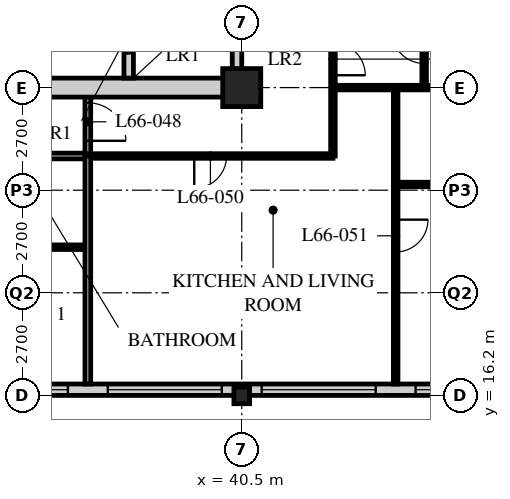
"""IFC4 building model, lengths in metres.
Left out: names, types, materials, properties, quantities, classifications, styles, units other than length and angle.
Written with IfcOpenShell. Run it as: python <this file> out.ifc"""

import sys

from ifc_helpers import new_model, si_unit, direction, frame, frame_2d, origin, origin_2d, place, context, subcontext, project, spatial, rectangle, hollow_rectangle, i_section, extrude, element, fill, save


model = new_model("IFC4")
c1 = context("Model", 3, precision=1e-05, world=origin(), true_north=direction((0.0, 1.0)))
c2 = subcontext(c1, "Body", "Model", "MODEL_VIEW")
j1 = project(units=[si_unit("LENGTHUNIT", "METRE"), si_unit("PLANEANGLEUNIT", "RADIAN")], contexts=[c1])
p1 = place(None, origin())
s1 = spatial("IfcSite", under=j1, at=p1, CompositionType="ELEMENT")
p2 = place(p1, origin())
s2 = spatial("IfcBuilding", under=s1, at=p2, CompositionType="ELEMENT")
p3 = place(p2, frame((0.0, 0.0, 258.0)))
s3 = spatial("IfcBuildingStorey", under=s2, at=p3, CompositionType="ELEMENT", Elevation=258.0)
p4 = place(p3, frame((40.5, 16.2, 0.0), z_axis=(0.0, 0.0, 1.0), x_axis=(1.0, 0.0, 0.0)))
e1 = element("IfcColumn", 1, at=p4, inside=s3, PredefinedType="COLUMN", context=c2, shape_type="SweptSolid", body=[
    extrude(i_section(OverallWidth=0.412, OverallDepth=0.437, WebThickness=0.036, FlangeThickness=0.058, FilletRadius=0.015, at=origin_2d()), origin(), (0.0, 0.0, 1.0), 3.9),
])
p5 = place(p3, frame((40.5, 24.3, 0.0), z_axis=(0.0, 0.0, 1.0), x_axis=(1.0, 0.0, 0.0)))
e2 = element("IfcColumn", 2, at=p5, inside=s3, PredefinedType="COLUMN", context=c2, shape_type="SweptSolid", body=[
    extrude(hollow_rectangle(XDim=1.0, YDim=1.0, WallThickness=0.1, at=origin_2d()), origin(), (0.0, 0.0, 1.0), 3.9),
])
p6 = place(p3, frame((8.4, 16.35, 0.0), z_axis=(0.0, 0.0, 1.0), x_axis=(1.0, 0.0, 0.0)))
e3 = element("IfcWall", 3, at=p6, inside=s3, PredefinedType="SOLIDWALL", context=c2, shape_type="SweptSolid", body=[
    extrude(rectangle(XDim=40.2, YDim=0.3, at=frame_2d((20.1, 0.0))), origin(), (0.0, 0.0, 1.0), 3.69),
])
p7 = place(p6, frame((0.225, 0.0, 0.6)))
e4 = element("IfcOpeningElement", 4, at=p7, cuts=e3, PredefinedType="OPENING", context=c2, shape_type="SweptSolid", body=[
    extrude(rectangle(XDim=3.0, YDim=2.4, at=frame_2d((1.5, 1.2))), frame((0.0, 0.16, 0.0), z_axis=(0.0, -1.0, 0.0), x_axis=(1.0, 0.0, 0.0)), (0.0, 0.0, 1.0), 0.32),
])
p8 = place(p6, frame((4.275, 0.0, 0.6)))
e5 = element("IfcOpeningElement", 5, at=p8, cuts=e3, PredefinedType="OPENING", context=c2, shape_type="SweptSolid", body=[
    extrude(rectangle(XDim=3.0, YDim=2.4, at=frame_2d((1.5, 1.2))), frame((0.0, 0.16, 0.0), z_axis=(0.0, -1.0, 0.0), x_axis=(1.0, 0.0, 0.0)), (0.0, 0.0, 1.0), 0.32),
])
p9 = place(p6, frame((8.325, 0.0, 0.6)))
e6 = element("IfcOpeningElement", 6, at=p9, cuts=e3, PredefinedType="OPENING", context=c2, shape_type="SweptSolid", body=[
    extrude(rectangle(XDim=3.0, YDim=2.4, at=frame_2d((1.5, 1.2))), frame((0.0, 0.16, 0.0), z_axis=(0.0, -1.0, 0.0), x_axis=(1.0, 0.0, 0.0)), (0.0, 0.0, 1.0), 0.32),
])
p10 = place(p6, frame((12.375, 0.0, 0.6)))
e7 = element("IfcOpeningElement", 7, at=p10, cuts=e3, PredefinedType="OPENING", context=c2, shape_type="SweptSolid", body=[
    extrude(rectangle(XDim=3.0, YDim=2.4, at=frame_2d((1.5, 1.2))), frame((0.0, 0.16, 0.0), z_axis=(0.0, -1.0, 0.0), x_axis=(1.0, 0.0, 0.0)), (0.0, 0.0, 1.0), 0.32),
])
p11 = place(p6, frame((16.425, 0.0, 0.6)))
e8 = element("IfcOpeningElement", 8, at=p11, cuts=e3, PredefinedType="OPENING", context=c2, shape_type="SweptSolid", body=[
    extrude(rectangle(XDim=3.0, YDim=2.4, at=frame_2d((1.5, 1.2))), frame((0.0, 0.16, 0.0), z_axis=(0.0, -1.0, 0.0), x_axis=(1.0, 0.0, 0.0)), (0.0, 0.0, 1.0), 0.32),
])
p12 = place(p6, frame((20.475, 0.0, 0.6)))
e9 = element("IfcOpeningElement", 9, at=p12, cuts=e3, PredefinedType="OPENING", context=c2, shape_type="SweptSolid", body=[
    extrude(rectangle(XDim=3.0, YDim=2.4, at=frame_2d((1.5, 1.2))), frame((0.0, 0.16, 0.0), z_axis=(0.0, -1.0, 0.0), x_axis=(1.0, 0.0, 0.0)), (0.0, 0.0, 1.0), 0.32),
])
p13 = place(p6, frame((24.525, 0.0, 0.6)))
e10 = element("IfcOpeningElement", 10, at=p13, cuts=e3, PredefinedType="OPENING", context=c2, shape_type="SweptSolid", body=[
    extrude(rectangle(XDim=3.0, YDim=2.4, at=frame_2d((1.5, 1.2))), frame((0.0, 0.16, 0.0), z_axis=(0.0, -1.0, 0.0), x_axis=(1.0, 0.0, 0.0)), (0.0, 0.0, 1.0), 0.32),
])
p14 = place(p6, frame((28.575, 0.0, 0.6)))
e11 = element("IfcOpeningElement", 11, at=p14, cuts=e3, PredefinedType="OPENING", context=c2, shape_type="SweptSolid", body=[
    extrude(rectangle(XDim=3.0, YDim=2.4, at=frame_2d((1.5, 1.2))), frame((0.0, 0.16, 0.0), z_axis=(0.0, -1.0, 0.0), x_axis=(1.0, 0.0, 0.0)), (0.0, 0.0, 1.0), 0.32),
])
p15 = place(p6, frame((32.625, 0.0, 0.6)))
e12 = element("IfcOpeningElement", 12, at=p15, cuts=e3, PredefinedType="OPENING", context=c2, shape_type="SweptSolid", body=[
    extrude(rectangle(XDim=3.0, YDim=2.4, at=frame_2d((1.5, 1.2))), frame((0.0, 0.16, 0.0), z_axis=(0.0, -1.0, 0.0), x_axis=(1.0, 0.0, 0.0)), (0.0, 0.0, 1.0), 0.32),
])
p16 = place(p6, frame((36.675, 0.0, 0.6)))
e13 = element("IfcOpeningElement", 13, at=p16, cuts=e3, PredefinedType="OPENING", context=c2, shape_type="SweptSolid", body=[
    extrude(rectangle(XDim=3.0, YDim=2.4, at=frame_2d((1.5, 1.2))), frame((0.0, 0.16, 0.0), z_axis=(0.0, -1.0, 0.0), x_axis=(1.0, 0.0, 0.0)), (0.0, 0.0, 1.0), 0.32),
])
p17 = place(p3, frame((8.1, 22.5, 0.0), z_axis=(0.0, 0.0, 1.0), x_axis=(1.0, 0.0, 0.0)))
e14 = element("IfcWall", 14, at=p17, inside=s3, PredefinedType="PARTITIONING", context=c2, shape_type="SweptSolid", body=[
    extrude(rectangle(XDim=28.35, YDim=0.15, at=frame_2d((14.175, 0.0))), origin(), (0.0, 0.0, 1.0), 3.69),
])
p18 = place(p17, frame((4.45, 0.0, 0.0)))
e15 = element("IfcOpeningElement", 15, at=p18, cuts=e14, PredefinedType="OPENING", context=c2, shape_type="SweptSolid", body=[
    extrude(rectangle(XDim=1.0, YDim=2.1, at=frame_2d((0.5, 1.05))), frame((0.0, 0.085, 0.0), z_axis=(0.0, -1.0, 0.0), x_axis=(1.0, 0.0, 0.0)), (0.0, 0.0, 1.0), 0.17),
])
p19 = place(p17, frame((12.55, 0.0, 0.0)))
e16 = element("IfcOpeningElement", 16, at=p19, cuts=e14, PredefinedType="OPENING", context=c2, shape_type="SweptSolid", body=[
    extrude(rectangle(XDim=1.0, YDim=2.1, at=frame_2d((0.5, 1.05))), frame((0.0, 0.085, 0.0), z_axis=(0.0, -1.0, 0.0), x_axis=(1.0, 0.0, 0.0)), (0.0, 0.0, 1.0), 0.17),
])
p20 = place(p17, frame((20.65, 0.0, 0.0)))
e17 = element("IfcOpeningElement", 17, at=p20, cuts=e14, PredefinedType="OPENING", context=c2, shape_type="SweptSolid", body=[
    extrude(rectangle(XDim=1.0, YDim=2.1, at=frame_2d((0.5, 1.05))), frame((0.0, 0.085, 0.0), z_axis=(0.0, -1.0, 0.0), x_axis=(1.0, 0.0, 0.0)), (0.0, 0.0, 1.0), 0.17),
])
p21 = place(p17, frame((2.625, 0.0, 0.0)))
e18 = element("IfcOpeningElement", 18, at=p21, cuts=e14, PredefinedType="OPENING", context=c2, shape_type="SweptSolid", body=[
    extrude(rectangle(XDim=1.0, YDim=2.1, at=frame_2d((0.5, 1.05))), frame((0.0, 0.085, 0.0), z_axis=(0.0, -1.0, 0.0), x_axis=(1.0, 0.0, 0.0)), (0.0, 0.0, 1.0), 0.17),
])
p22 = place(p3, frame((36.45, 22.5, 0.0), z_axis=(0.0, 0.0, 1.0), x_axis=(0.0, 1.0, 0.0)))
e19 = element("IfcWall", 19, at=p22, inside=s3, PredefinedType="PARTITIONING", context=c2, shape_type="SweptSolid", body=[
    extrude(rectangle(XDim=1.8, YDim=0.15, at=frame_2d((0.9, 0.0))), origin(), (0.0, 0.0, 1.0), 3.69),
])
p23 = place(p22, frame((0.4, 0.0, 0.0)))
e20 = element("IfcOpeningElement", 20, at=p23, cuts=e19, PredefinedType="OPENING", context=c2, shape_type="SweptSolid", body=[
    extrude(rectangle(XDim=1.0, YDim=2.1, at=frame_2d((0.5, 1.05))), frame((0.0, 0.085, 0.0), z_axis=(0.0, -1.0, 0.0), x_axis=(1.0, 0.0, 0.0)), (0.0, 0.0, 1.0), 0.17),
])
p24 = place(p3, frame((8.1, 20.1, 0.0), z_axis=(0.0, 0.0, 1.0), x_axis=(1.0, 0.0, 0.0)))
e21 = element("IfcWall", 21, at=p24, inside=s3, PredefinedType="PARTITIONING", context=c2, shape_type="SweptSolid", body=[
    extrude(rectangle(XDim=28.35, YDim=0.12, at=frame_2d((14.175, 0.0))), origin(), (0.0, 0.0, 1.0), 3.69),
])
p25 = place(p24, frame((5.025, 0.0, 0.0)))
e22 = element("IfcOpeningElement", 22, at=p25, cuts=e21, PredefinedType="OPENING", context=c2, shape_type="SweptSolid", body=[
    extrude(rectangle(XDim=0.85, YDim=2.1, at=frame_2d((0.425, 1.05))), frame((0.0, 0.07, 0.0), z_axis=(0.0, -1.0, 0.0), x_axis=(1.0, 0.0, 0.0)), (0.0, 0.0, 1.0), 0.14),
])
p26 = place(p24, frame((8.425, 0.0, 0.0)))
e23 = element("IfcOpeningElement", 23, at=p26, cuts=e21, PredefinedType="OPENING", context=c2, shape_type="SweptSolid", body=[
    extrude(rectangle(XDim=0.85, YDim=2.1, at=frame_2d((0.425, 1.05))), frame((0.0, 0.07, 0.0), z_axis=(0.0, -1.0, 0.0), x_axis=(1.0, 0.0, 0.0)), (0.0, 0.0, 1.0), 0.14),
])
p27 = place(p24, frame((13.125, 0.0, 0.0)))
e24 = element("IfcOpeningElement", 24, at=p27, cuts=e21, PredefinedType="OPENING", context=c2, shape_type="SweptSolid", body=[
    extrude(rectangle(XDim=0.85, YDim=2.1, at=frame_2d((0.425, 1.05))), frame((0.0, 0.07, 0.0), z_axis=(0.0, -1.0, 0.0), x_axis=(1.0, 0.0, 0.0)), (0.0, 0.0, 1.0), 0.14),
])
p28 = place(p24, frame((16.525, 0.0, 0.0)))
e25 = element("IfcOpeningElement", 25, at=p28, cuts=e21, PredefinedType="OPENING", context=c2, shape_type="SweptSolid", body=[
    extrude(rectangle(XDim=0.85, YDim=2.1, at=frame_2d((0.425, 1.05))), frame((0.0, 0.07, 0.0), z_axis=(0.0, -1.0, 0.0), x_axis=(1.0, 0.0, 0.0)), (0.0, 0.0, 1.0), 0.14),
])
p29 = place(p24, frame((21.225, 0.0, 0.0)))
e26 = element("IfcOpeningElement", 26, at=p29, cuts=e21, PredefinedType="OPENING", context=c2, shape_type="SweptSolid", body=[
    extrude(rectangle(XDim=0.85, YDim=2.1, at=frame_2d((0.425, 1.05))), frame((0.0, 0.07, 0.0), z_axis=(0.0, -1.0, 0.0), x_axis=(1.0, 0.0, 0.0)), (0.0, 0.0, 1.0), 0.14),
])
p30 = place(p24, frame((24.625, 0.0, 0.0)))
e27 = element("IfcOpeningElement", 27, at=p30, cuts=e21, PredefinedType="OPENING", context=c2, shape_type="SweptSolid", body=[
    extrude(rectangle(XDim=0.85, YDim=2.1, at=frame_2d((0.425, 1.05))), frame((0.0, 0.07, 0.0), z_axis=(0.0, -1.0, 0.0), x_axis=(1.0, 0.0, 0.0)), (0.0, 0.0, 1.0), 0.14),
])
p31 = place(p24, frame((2.725, 0.0, 0.0)))
e28 = element("IfcOpeningElement", 28, at=p31, cuts=e21, PredefinedType="OPENING", context=c2, shape_type="SweptSolid", body=[
    extrude(rectangle(XDim=0.85, YDim=2.1, at=frame_2d((0.425, 1.05))), frame((0.0, 0.07, 0.0), z_axis=(0.0, -1.0, 0.0), x_axis=(1.0, 0.0, 0.0)), (0.0, 0.0, 1.0), 0.14),
])
p32 = place(p3, frame((42.9, 22.5, 0.0), z_axis=(0.0, 0.0, 1.0), x_axis=(0.0, 1.0, 0.0)))
e29 = element("IfcWall", 29, at=p32, inside=s3, PredefinedType="PARTITIONING", context=c2, shape_type="SweptSolid", body=[
    extrude(rectangle(XDim=9.9, YDim=0.12, at=frame_2d((4.95, 0.0))), origin(), (0.0, 0.0, 1.0), 3.69),
])
p33 = place(p32, frame((2.125, 0.0, 0.0)))
e30 = element("IfcOpeningElement", 30, at=p33, cuts=e29, PredefinedType="OPENING", context=c2, shape_type="SweptSolid", body=[
    extrude(rectangle(XDim=0.85, YDim=2.1, at=frame_2d((0.425, 1.05))), frame((0.0, 0.07, 0.0), z_axis=(0.0, -1.0, 0.0), x_axis=(1.0, 0.0, 0.0)), (0.0, 0.0, 1.0), 0.14),
])
p34 = place(p32, frame((6.175, 0.0, 0.0)))
e31 = element("IfcOpeningElement", 31, at=p34, cuts=e29, PredefinedType="OPENING", context=c2, shape_type="SweptSolid", body=[
    extrude(rectangle(XDim=0.85, YDim=2.1, at=frame_2d((0.425, 1.05))), frame((0.0, 0.07, 0.0), z_axis=(0.0, -1.0, 0.0), x_axis=(1.0, 0.0, 0.0)), (0.0, 0.0, 1.0), 0.14),
])
p35 = place(p3, frame((36.45, 22.5, 0.0), z_axis=(0.0, 0.0, 1.0), x_axis=(1.0, 0.0, 0.0)))
e32 = element("IfcWall", 32, at=p35, inside=s3, PredefinedType="PARTITIONING", context=c2, shape_type="SweptSolid", body=[
    extrude(rectangle(XDim=6.45, YDim=0.12, at=frame_2d((3.225, 0.0))), origin(), (0.0, 0.0, 1.0), 3.69),
])
p36 = place(p35, frame((2.8, 0.0, 0.0)))
e33 = element("IfcOpeningElement", 33, at=p36, cuts=e32, PredefinedType="OPENING", context=c2, shape_type="SweptSolid", body=[
    extrude(rectangle(XDim=0.85, YDim=2.1, at=frame_2d((0.425, 1.05))), frame((0.0, 0.07, 0.0), z_axis=(0.0, -1.0, 0.0), x_axis=(1.0, 0.0, 0.0)), (0.0, 0.0, 1.0), 0.14),
])
p37 = place(p3, frame((42.9, 24.3, 0.0), z_axis=(0.0, 0.0, 1.0), x_axis=(1.0, 0.0, 0.0)))
e34 = element("IfcWall", 34, at=p37, inside=s3, PredefinedType="PARTITIONING", context=c2, shape_type="SweptSolid", body=[
    extrude(rectangle(XDim=9.45, YDim=0.12, at=frame_2d((4.725, 0.0))), origin(), (0.0, 0.0, 1.0), 3.078),
])
p38 = place(p3, frame((36.45, 16.5, 0.0), z_axis=(0.0, 0.0, 1.0), x_axis=(0.0, 1.0, 0.0)))
e35 = element("IfcWall", 35, at=p38, inside=s3, PredefinedType="PARTITIONING", context=c2, shape_type="SweptSolid", body=[
    extrude(rectangle(XDim=6.0, YDim=0.15, at=frame_2d((3.0, 0.0))), origin(), (0.0, 0.0, 1.0), 3.69),
])
p39 = place(p3, frame((44.55, 16.5, 0.0), z_axis=(0.0, 0.0, 1.0), x_axis=(0.0, 1.0, 0.0)))
e36 = element("IfcWall", 36, at=p39, inside=s3, PredefinedType="PARTITIONING", context=c2, shape_type="SweptSolid", body=[
    extrude(rectangle(XDim=7.8, YDim=0.12, at=frame_2d((3.9, 0.0))), origin(), (0.0, 0.0, 1.0), 3.69),
])
p40 = place(p39, frame((3.475, 0.0, 0.0)))
e37 = element("IfcOpeningElement", 37, at=p40, cuts=e36, PredefinedType="OPENING", context=c2, shape_type="SweptSolid", body=[
    extrude(rectangle(XDim=0.85, YDim=2.1, at=frame_2d((0.425, 1.05))), frame((0.0, 0.07, 0.0), z_axis=(0.0, -1.0, 0.0), x_axis=(1.0, 0.0, 0.0)), (0.0, 0.0, 1.0), 0.14),
])
p41 = place(p3, frame((45.3, 24.3, 0.0), z_axis=(0.0, 0.0, 1.0), x_axis=(0.0, 1.0, 0.0)))
e38 = element("IfcWall", 38, at=p41, inside=s3, PredefinedType="PARTITIONING", context=c2, shape_type="SweptSolid", body=[
    extrude(rectangle(XDim=1.76, YDim=0.12, at=frame_2d((0.88, 0.0))), origin(), (0.0, 0.0, 1.0), 3.69),
])
p42 = place(p41, frame((0.635, 0.0, 0.0)))
e39 = element("IfcOpeningElement", 39, at=p42, cuts=e38, PredefinedType="OPENING", context=c2, shape_type="SweptSolid", body=[
    extrude(rectangle(XDim=0.85, YDim=2.1, at=frame_2d((0.425, 1.05))), frame((0.0, 0.07, 0.0), z_axis=(0.0, -1.0, 0.0), x_axis=(1.0, 0.0, 0.0)), (0.0, 0.0, 1.0), 0.14),
])
p43 = place(p3, frame((44.55, 21.75, 0.0), z_axis=(0.0, 0.0, 1.0), x_axis=(1.0, 0.0, 0.0)))
e40 = element("IfcWall", 40, at=p43, inside=s3, PredefinedType="PARTITIONING", context=c2, shape_type="SweptSolid", body=[
    extrude(rectangle(XDim=7.8, YDim=0.12, at=frame_2d((3.9, 0.0))), origin(), (0.0, 0.0, 1.0), 3.69),
])
p44 = place(p43, frame((3.475, 0.0, 0.0)))
e41 = element("IfcOpeningElement", 41, at=p44, cuts=e40, PredefinedType="OPENING", context=c2, shape_type="SweptSolid", body=[
    extrude(rectangle(XDim=0.85, YDim=2.1, at=frame_2d((0.425, 1.05))), frame((0.0, 0.07, 0.0), z_axis=(0.0, -1.0, 0.0), x_axis=(1.0, 0.0, 0.0)), (0.0, 0.0, 1.0), 0.14),
])
p45 = place(p3, frame((15.95, 24.3, 0.0), z_axis=(0.0, 0.0, 1.0), x_axis=(1.0, 0.0, 0.0)))
e42 = element("IfcWall", 42, at=p45, inside=s3, PredefinedType="SOLIDWALL", context=c2, shape_type="SweptSolid", body=[
    extrude(rectangle(XDim=24.55, YDim=0.5, at=frame_2d((12.275, 0.0))), origin(), (0.0, 0.0, 1.0), 3.04),
])
p46 = place(p45, frame((11.5, 0.0, 0.0)))
e43 = element("IfcOpeningElement", 43, at=p46, cuts=e42, PredefinedType="OPENING", context=c2, shape_type="SweptSolid", body=[
    extrude(rectangle(XDim=1.8, YDim=2.4, at=frame_2d((0.9, 1.2))), frame((0.0, 0.26, 0.0), z_axis=(0.0, -1.0, 0.0), x_axis=(1.0, 0.0, 0.0)), (0.0, 0.0, 1.0), 0.52),
])
p47 = place(p3, frame((40.375, 24.55, 0.0), z_axis=(0.0, 0.0, 1.0), x_axis=(0.0, 1.0, 0.0)))
e44 = element("IfcWall", 44, at=p47, inside=s3, PredefinedType="SOLIDWALL", context=c2, shape_type="SweptSolid", body=[
    extrude(rectangle(XDim=15.7, YDim=0.25, at=frame_2d((7.85, 0.0))), origin(), (0.0, 0.0, 1.0), 3.078),
])
p48 = place(p3, frame((37.525, 24.55, 0.0), z_axis=(0.0, 0.0, 1.0), x_axis=(0.0, 1.0, 0.0)))
e45 = element("IfcWall", 45, at=p48, inside=s3, PredefinedType="SOLIDWALL", context=c2, shape_type="SweptSolid", body=[
    extrude(rectangle(XDim=7.75, YDim=0.25, at=frame_2d((3.875, 0.0))), origin(), (0.0, 0.0, 1.0), 3.69),
])
p49 = place(p48, frame((0.65, 0.0, 0.0)))
e46 = element("IfcOpeningElement", 46, at=p49, cuts=e45, PredefinedType="OPENING", context=c2, shape_type="SweptSolid", body=[
    extrude(rectangle(XDim=1.1, YDim=2.4, at=frame_2d((0.55, 1.2))), frame((0.0, 0.135, 0.0), z_axis=(0.0, -1.0, 0.0), x_axis=(1.0, 0.0, 0.0)), (0.0, 0.0, 1.0), 0.27),
])
p50 = place(p48, frame((3.25, 0.0, 0.0)))
e47 = element("IfcOpeningElement", 47, at=p50, cuts=e45, PredefinedType="OPENING", context=c2, shape_type="SweptSolid", body=[
    extrude(rectangle(XDim=1.1, YDim=2.4, at=frame_2d((0.55, 1.2))), frame((0.0, 0.135, 0.0), z_axis=(0.0, -1.0, 0.0), x_axis=(1.0, 0.0, 0.0)), (0.0, 0.0, 1.0), 0.27),
])
p51 = place(p48, frame((5.85, 0.0, 0.0)))
e48 = element("IfcOpeningElement", 48, at=p51, cuts=e45, PredefinedType="OPENING", context=c2, shape_type="SweptSolid", body=[
    extrude(rectangle(XDim=1.1, YDim=2.4, at=frame_2d((0.55, 1.2))), frame((0.0, 0.135, 0.0), z_axis=(0.0, -1.0, 0.0), x_axis=(1.0, 0.0, 0.0)), (0.0, 0.0, 1.0), 0.27),
])
p52 = place(p13, origin())
e49 = element("IfcWindow", 49, at=p52, inside=s3, PartitioningType="SINGLE_PANEL", PredefinedType="WINDOW", context=c2, shape_type="SweptSolid", body=[
    extrude(rectangle(XDim=3.0, YDim=2.4, at=frame_2d((1.5, 1.2))), frame((0.0, 0.03, 0.0), z_axis=(0.0, -1.0, 0.0), x_axis=(1.0, 0.0, 0.0)), (0.0, 0.0, 1.0), 0.06),
])
fill(e10, e49)
p53 = place(p14, origin())
e50 = element("IfcWindow", 50, at=p53, inside=s3, PartitioningType="SINGLE_PANEL", PredefinedType="WINDOW", context=c2, shape_type="SweptSolid", body=[
    extrude(rectangle(XDim=3.0, YDim=2.4, at=frame_2d((1.5, 1.2))), frame((0.0, 0.03, 0.0), z_axis=(0.0, -1.0, 0.0), x_axis=(1.0, 0.0, 0.0)), (0.0, 0.0, 1.0), 0.06),
])
fill(e11, e50)
p54 = place(p15, origin())
e51 = element("IfcWindow", 51, at=p54, inside=s3, PartitioningType="SINGLE_PANEL", PredefinedType="WINDOW", context=c2, shape_type="SweptSolid", body=[
    extrude(rectangle(XDim=3.0, YDim=2.4, at=frame_2d((1.5, 1.2))), frame((0.0, 0.03, 0.0), z_axis=(0.0, -1.0, 0.0), x_axis=(1.0, 0.0, 0.0)), (0.0, 0.0, 1.0), 0.06),
])
fill(e12, e51)
p55 = place(p16, origin())
e52 = element("IfcWindow", 52, at=p55, inside=s3, PartitioningType="SINGLE_PANEL", PredefinedType="WINDOW", context=c2, shape_type="SweptSolid", body=[
    extrude(rectangle(XDim=3.0, YDim=2.4, at=frame_2d((1.5, 1.2))), frame((0.0, 0.03, 0.0), z_axis=(0.0, -1.0, 0.0), x_axis=(1.0, 0.0, 0.0)), (0.0, 0.0, 1.0), 0.06),
])
fill(e13, e52)
p56 = place(p23, origin())
e53 = element("IfcDoor", 53, at=p56, inside=s3, OperationType="SINGLE_SWING_RIGHT", PredefinedType="DOOR", context=c2, shape_type="SweptSolid", body=[
    extrude(rectangle(XDim=1.0, YDim=2.1, at=frame_2d((0.5, 1.05))), frame((0.0, 0.025, 0.0), z_axis=(0.0, -1.0, 0.0), x_axis=(1.0, 0.0, 0.0)), (0.0, 0.0, 1.0), 0.05),
])
fill(e20, e53)
p57 = place(p36, origin())
e54 = element("IfcDoor", 54, at=p57, inside=s3, OperationType="SINGLE_SWING_RIGHT", PredefinedType="DOOR", context=c2, shape_type="SweptSolid", body=[
    extrude(rectangle(XDim=0.85, YDim=2.1, at=frame_2d((0.425, 1.05))), frame((0.0, 0.025, 0.0), z_axis=(0.0, -1.0, 0.0), x_axis=(1.0, 0.0, 0.0)), (0.0, 0.0, 1.0), 0.05),
])
fill(e33, e54)
p58 = place(p40, origin())
e55 = element("IfcDoor", 55, at=p58, inside=s3, OperationType="SINGLE_SWING_LEFT", PredefinedType="DOOR", context=c2, shape_type="SweptSolid", body=[
    extrude(rectangle(XDim=0.85, YDim=2.1, at=frame_2d((0.425, 1.05))), frame((0.0, 0.025, 0.0), z_axis=(0.0, -1.0, 0.0), x_axis=(1.0, 0.0, 0.0)), (0.0, 0.0, 1.0), 0.05),
])
fill(e37, e55)
p59 = place(p33, origin())
e56 = element("IfcDoor", 56, at=p59, inside=s3, OperationType="SINGLE_SWING_RIGHT", PredefinedType="DOOR", context=c2, shape_type="SweptSolid", body=[
    extrude(rectangle(XDim=0.85, YDim=2.1, at=frame_2d((0.425, 1.05))), frame((0.0, 0.025, 0.0), z_axis=(0.0, -1.0, 0.0), x_axis=(1.0, 0.0, 0.0)), (0.0, 0.0, 1.0), 0.05),
])
fill(e30, e56)
p60 = place(p42, origin())
e57 = element("IfcDoor", 57, at=p60, inside=s3, OperationType="SINGLE_SWING_RIGHT", PredefinedType="DOOR", context=c2, shape_type="SweptSolid", body=[
    extrude(rectangle(XDim=0.85, YDim=2.1, at=frame_2d((0.425, 1.05))), frame((0.0, 0.025, 0.0), z_axis=(0.0, -1.0, 0.0), x_axis=(1.0, 0.0, 0.0)), (0.0, 0.0, 1.0), 0.05),
])
fill(e39, e57)
p61 = place(p49, origin())
e58 = element("IfcDoor", 58, at=p61, inside=s3, OperationType="DOUBLE_DOOR_SLIDING", PredefinedType="DOOR", context=c2, shape_type="SweptSolid", body=[
    extrude(rectangle(XDim=1.1, YDim=2.4, at=frame_2d((0.55, 1.2))), frame((0.0, 0.025, 0.0), z_axis=(0.0, -1.0, 0.0), x_axis=(1.0, 0.0, 0.0)), (0.0, 0.0, 1.0), 0.05),
])
fill(e46, e58)
save(model, sys.argv[1])
